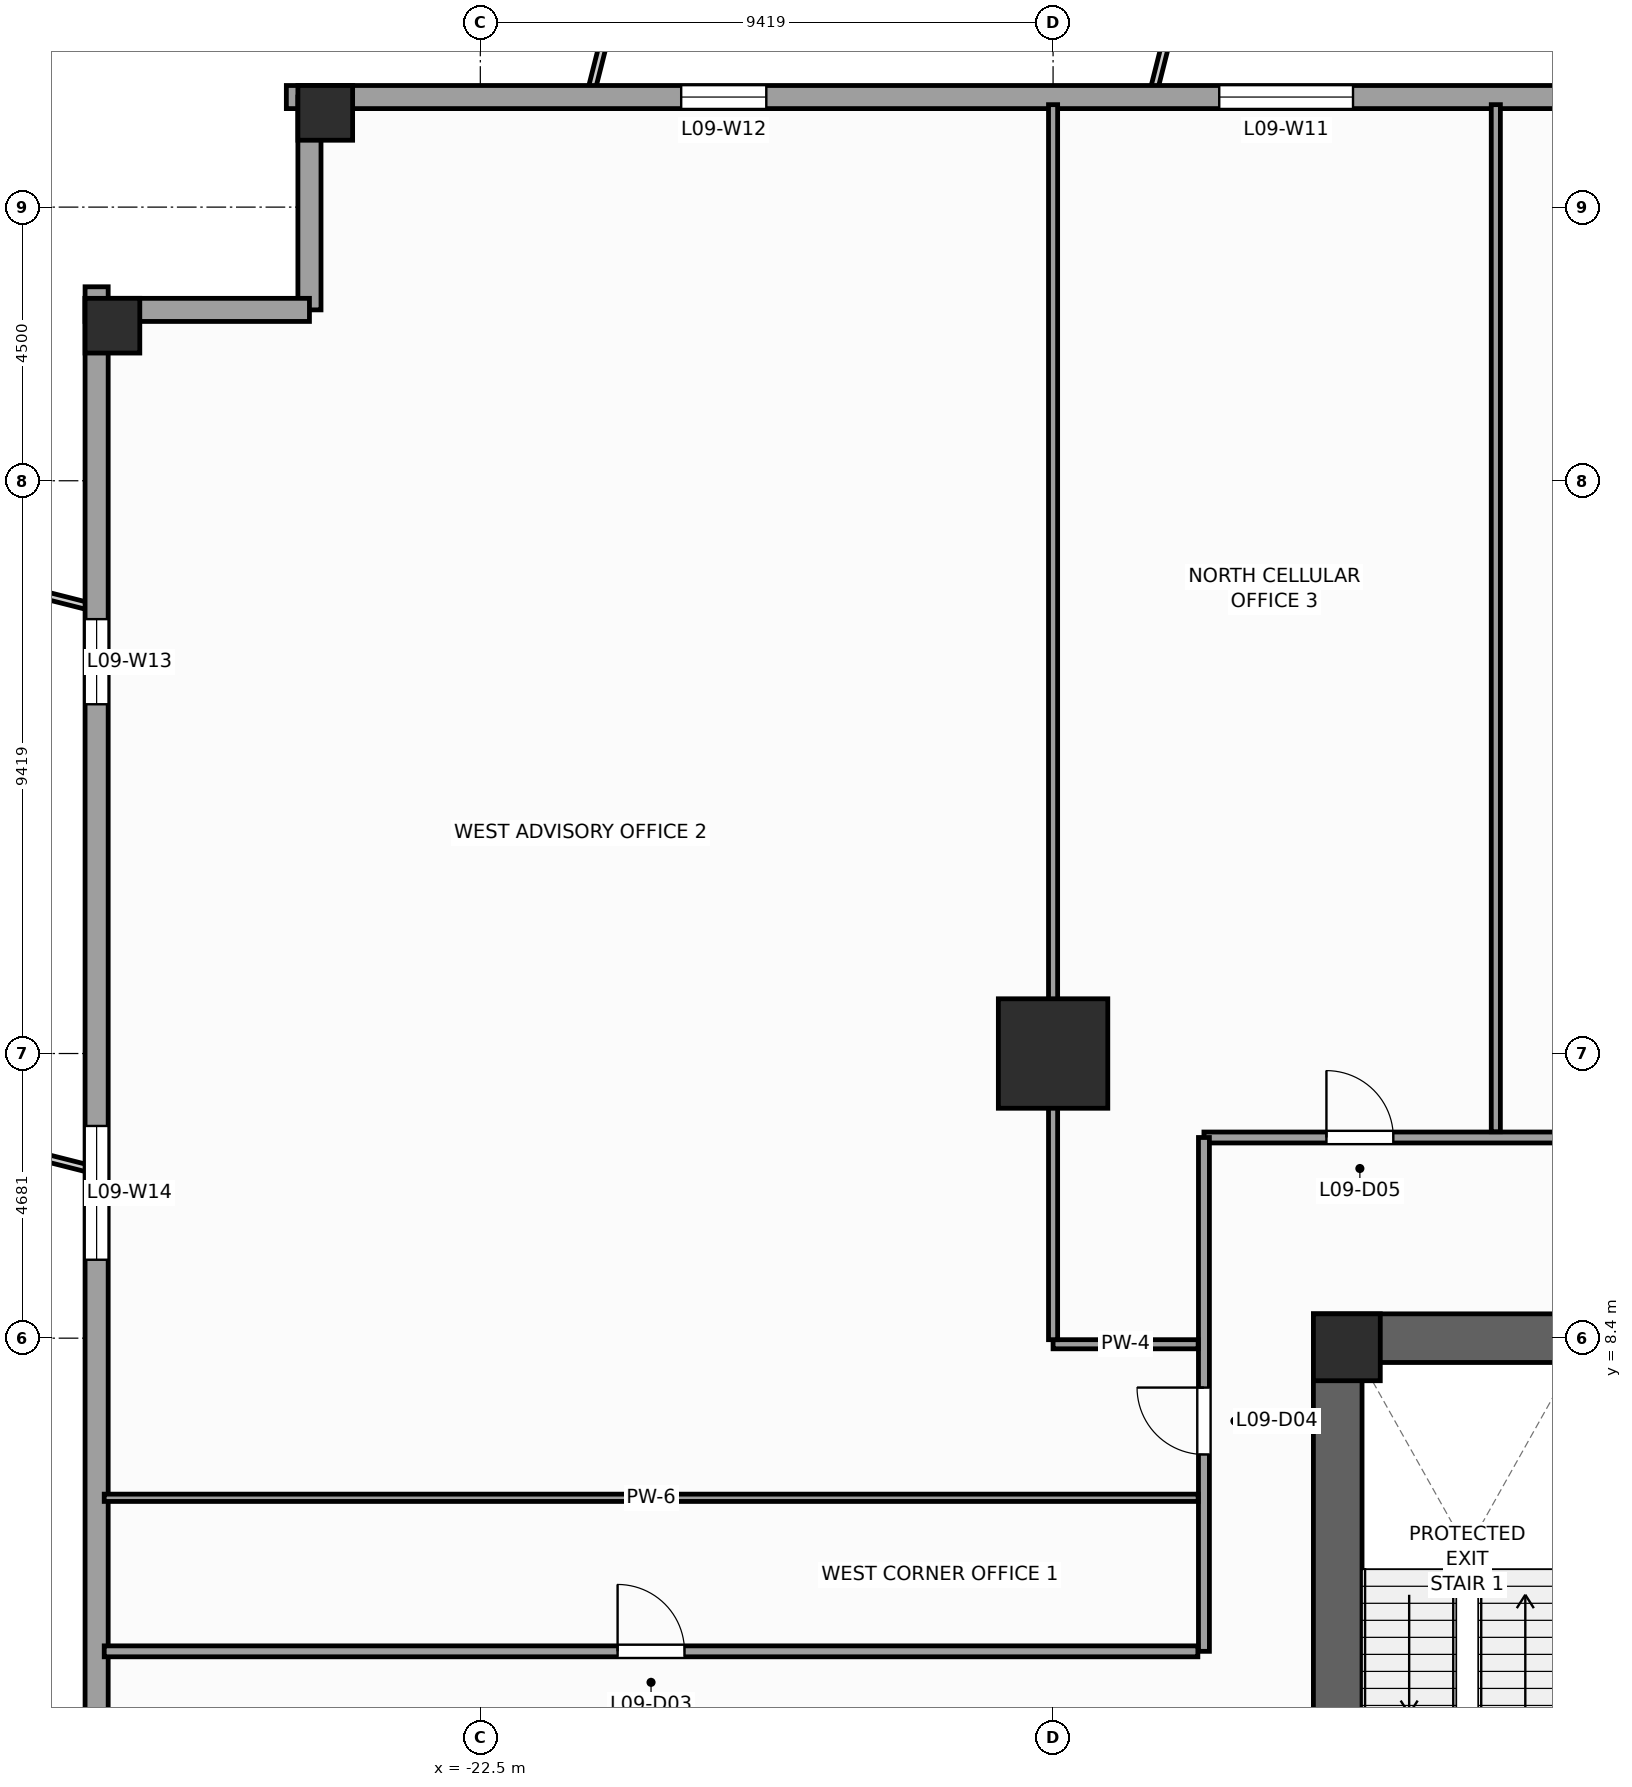
"""IFC4 building model, lengths in metres.
Left out: names, types, materials, properties, quantities, classifications, styles, units other than length and angle.
Written with IfcOpenShell. Run it as: python <this file> out.ifc"""

import sys

from ifc_helpers import new_model, si_unit, direction, frame, frame_2d, origin, origin_2d, place, context, subcontext, project, spatial, rectangle, extrude, source, transform, mapped, element, fill, save


model = new_model("IFC4")
c1 = context("Model", 3, precision=1e-05, world=origin(), true_north=direction((0.0, 1.0)))
c2 = subcontext(c1, "Body", "Model", "MODEL_VIEW")
j1 = project(units=[si_unit("LENGTHUNIT", "METRE"), si_unit("PLANEANGLEUNIT", "RADIAN")], contexts=[c1])
p1 = place(None, origin())
s1 = spatial("IfcSite", under=j1, at=p1, CompositionType="ELEMENT")
p2 = place(p1, origin())
s2 = spatial("IfcBuilding", under=s1, at=p2, CompositionType="ELEMENT")
p3 = place(p2, frame((0.0, 0.0, 42.0)))
s3 = spatial("IfcBuildingStorey", under=s2, at=p3, CompositionType="ELEMENT", Elevation=42.0)
p4 = place(p3, frame((-8.8, 8.4, 0.0), z_axis=(0.0, 0.0, 1.0), x_axis=(1.0, 0.0, 0.0)))
e1 = element("IfcWall", 1, at=p4, inside=s3, PredefinedType="SHEAR", context=c2, shape_type="SweptSolid", body=[
    extrude(rectangle(XDim=17.6, YDim=0.8, at=frame_2d((8.8, 0.0))), origin(), (0.0, 0.0, 1.0), 4.0),
])
p5 = place(p3, frame((-8.4, -8.0, 0.0), z_axis=(0.0, 0.0, 1.0), x_axis=(0.0, 1.0, 0.0)))
e2 = element("IfcWall", 2, at=p5, inside=s3, PredefinedType="SHEAR", context=c2, shape_type="SweptSolid", body=[
    extrude(rectangle(XDim=16.0, YDim=0.8, at=frame_2d((8.0, 0.0))), origin(), (0.0, 0.0, 1.0), 4.0),
])
p6 = place(p5, frame((4.69, 0.0, 0.0)))
e3 = element("IfcOpeningElement", 3, at=p6, cuts=e2, PredefinedType="OPENING", context=c2, shape_type="SweptSolid", body=[
    extrude(rectangle(XDim=1.3, YDim=2.2, at=frame_2d((0.65, 1.1))), frame((0.0, 0.41, 0.0), z_axis=(0.0, -1.0, 0.0), x_axis=(1.0, 0.0, 0.0)), (0.0, 0.0, 1.0), 0.82),
])
m1 = source(origin(), c2, "Body", "SweptSolid", [
    extrude(rectangle(XDim=1.1, YDim=1.1, at=origin_2d()), origin(), (0.0, 0.0, 1.0), 4.0),
])
p7 = place(p3, frame((-8.25, 8.25, 0.0), z_axis=(0.0, 0.0, 1.0), x_axis=(1.0, 0.0, 0.0)))
e4 = element("IfcColumn", 4, at=p7, inside=s3, PredefinedType="PILASTER", context=c2, shape_type="MappedRepresentation", body=[
    mapped(m1, transform((0.0, 0.0, 0.0), scale=1.0)),
])
m2 = source(origin(), c2, "Body", "SweptSolid", [
    extrude(rectangle(XDim=1.8, YDim=1.8, at=origin_2d()), origin(), (0.0, 0.0, 1.0), 4.0),
])
p8 = place(p3, frame((-13.081, 13.081, 0.0), z_axis=(0.0, 0.0, 1.0), x_axis=(1.0, 0.0, 0.0)))
e5 = element("IfcColumn", 5, at=p8, inside=s3, PredefinedType="COLUMN", context=c2, shape_type="MappedRepresentation", body=[
    mapped(m2, transform((0.0, 0.0, 0.0), scale=1.0)),
])
m3 = source(origin(), c2, "Body", "SweptSolid", [
    extrude(rectangle(XDim=0.9, YDim=0.9, at=origin_2d()), origin(), (0.0, 0.0, 1.0), 4.0),
])
for number, where, z_axis, x_axis in (
    (6, (-25.05, 28.55, 0.0), (0.0, 0.0, 1.0), (1.0, 0.0, 0.0)),
    (7, (-28.55, 25.05, 0.0), (0.0, 0.0, 1.0), (1.0, 0.0, 0.0)),
):
    element("IfcColumn", number, at=place(p3, frame(where, z_axis=z_axis, x_axis=x_axis)), inside=s3, PredefinedType="COLUMN", context=c2, shape_type="MappedRepresentation", body=[
        mapped(m3, transform((0.0, 0.0, 0.0), scale=1.0)),
    ])
p9 = place(p3, frame((25.69, 28.81, 0.0), z_axis=(0.0, 0.0, 1.0), x_axis=(-1.0, 0.0, 0.0)))
e8 = element("IfcWall", 8, at=p9, inside=s3, PredefinedType="STANDARD", context=c2, shape_type="SweptSolid", body=[
    extrude(rectangle(XDim=51.38, YDim=0.38, at=frame_2d((25.69, 0.0))), origin(), (0.0, 0.0, 1.0), 3.12),
])
p10 = place(p9, frame((20.415, 0.0, 0.0)))
e9 = element("IfcOpeningElement", 9, at=p10, cuts=e8, PredefinedType="OPENING", context=c2, shape_type="SweptSolid", body=[
    extrude(rectangle(XDim=1.05, YDim=2.25, at=frame_2d((0.525, 1.125))), frame((0.0, 0.2, 0.0), z_axis=(0.0, -1.0, 0.0), x_axis=(1.0, 0.0, 0.0)), (0.0, 0.0, 1.0), 0.4),
])
p11 = place(p9, frame((5.466, 0.0, 0.49)))
e10 = element("IfcOpeningElement", 10, at=p11, cuts=e8, PredefinedType="OPENING", context=c2, shape_type="SweptSolid", body=[
    extrude(rectangle(XDim=1.4, YDim=2.4, at=frame_2d((0.7, 1.2))), frame((0.0, 0.2, 0.0), z_axis=(0.0, -1.0, 0.0), x_axis=(1.0, 0.0, 0.0)), (0.0, 0.0, 1.0), 0.4),
])
p12 = place(p9, frame((13.8, 0.0, 0.49)))
e11 = element("IfcOpeningElement", 11, at=p12, cuts=e8, PredefinedType="OPENING", context=c2, shape_type="SweptSolid", body=[
    extrude(rectangle(XDim=2.2, YDim=2.4, at=frame_2d((1.1, 1.2))), frame((0.0, 0.2, 0.0), z_axis=(0.0, -1.0, 0.0), x_axis=(1.0, 0.0, 0.0)), (0.0, 0.0, 1.0), 0.4),
])
p13 = place(p9, frame((33.838, 0.0, 0.49)))
e12 = element("IfcOpeningElement", 12, at=p13, cuts=e8, PredefinedType="OPENING", context=c2, shape_type="SweptSolid", body=[
    extrude(rectangle(XDim=2.2, YDim=2.4, at=frame_2d((1.1, 1.2))), frame((0.0, 0.2, 0.0), z_axis=(0.0, -1.0, 0.0), x_axis=(1.0, 0.0, 0.0)), (0.0, 0.0, 1.0), 0.4),
])
p14 = place(p9, frame((43.487, 0.0, 0.49)))
e13 = element("IfcOpeningElement", 13, at=p14, cuts=e8, PredefinedType="OPENING", context=c2, shape_type="SweptSolid", body=[
    extrude(rectangle(XDim=1.4, YDim=2.4, at=frame_2d((0.7, 1.2))), frame((0.0, 0.2, 0.0), z_axis=(0.0, -1.0, 0.0), x_axis=(1.0, 0.0, 0.0)), (0.0, 0.0, 1.0), 0.4),
])
p15 = place(p3, frame((-25.31, 28.81, 0.0), z_axis=(0.0, 0.0, 1.0), x_axis=(0.0, -1.0, 0.0)))
e14 = element("IfcWall", 14, at=p15, inside=s3, PredefinedType="STANDARD", context=c2, shape_type="SweptSolid", body=[
    extrude(rectangle(XDim=3.5, YDim=0.38, at=frame_2d((1.75, 0.0))), origin(), (0.0, 0.0, 1.0), 3.72),
])
p16 = place(p3, frame((-25.31, 25.31, 0.0), z_axis=(0.0, 0.0, 1.0), x_axis=(-1.0, 0.0, 0.0)))
e15 = element("IfcWall", 15, at=p16, inside=s3, PredefinedType="STANDARD", context=c2, shape_type="SweptSolid", body=[
    extrude(rectangle(XDim=3.69, YDim=0.38, at=frame_2d((1.845, 0.0))), origin(), (0.0, 0.0, 1.0), 3.72),
])
p17 = place(p3, frame((-28.81, 25.69, 0.0), z_axis=(0.0, 0.0, 1.0), x_axis=(0.0, -1.0, 0.0)))
e16 = element("IfcWall", 16, at=p17, inside=s3, PredefinedType="STANDARD", context=c2, shape_type="SweptSolid", body=[
    extrude(rectangle(XDim=51.38, YDim=0.38, at=frame_2d((25.69, 0.0))), origin(), (0.0, 0.0, 1.0), 3.12),
])
p18 = place(p17, frame((5.466, 0.0, 0.49)))
e17 = element("IfcOpeningElement", 17, at=p18, cuts=e16, PredefinedType="OPENING", context=c2, shape_type="SweptSolid", body=[
    extrude(rectangle(XDim=1.4, YDim=2.4, at=frame_2d((0.7, 1.2))), frame((0.0, 0.2, 0.0), z_axis=(0.0, -1.0, 0.0), x_axis=(1.0, 0.0, 0.0)), (0.0, 0.0, 1.0), 0.4),
])
p19 = place(p17, frame((13.8, 0.0, 0.49)))
e18 = element("IfcOpeningElement", 18, at=p19, cuts=e16, PredefinedType="OPENING", context=c2, shape_type="SweptSolid", body=[
    extrude(rectangle(XDim=2.2, YDim=2.4, at=frame_2d((1.1, 1.2))), frame((0.0, 0.2, 0.0), z_axis=(0.0, -1.0, 0.0), x_axis=(1.0, 0.0, 0.0)), (0.0, 0.0, 1.0), 0.4),
])
p20 = place(p17, frame((33.838, 0.0, 0.49)))
e19 = element("IfcOpeningElement", 19, at=p20, cuts=e16, PredefinedType="OPENING", context=c2, shape_type="SweptSolid", body=[
    extrude(rectangle(XDim=2.2, YDim=2.4, at=frame_2d((1.1, 1.2))), frame((0.0, 0.2, 0.0), z_axis=(0.0, -1.0, 0.0), x_axis=(1.0, 0.0, 0.0)), (0.0, 0.0, 1.0), 0.4),
])
p21 = place(p17, frame((43.487, 0.0, 0.49)))
e20 = element("IfcOpeningElement", 20, at=p21, cuts=e16, PredefinedType="OPENING", context=c2, shape_type="SweptSolid", body=[
    extrude(rectangle(XDim=1.4, YDim=2.4, at=frame_2d((0.7, 1.2))), frame((0.0, 0.2, 0.0), z_axis=(0.0, -1.0, 0.0), x_axis=(1.0, 0.0, 0.0)), (0.0, 0.0, 1.0), 0.4),
])
p22 = place(p3, frame((-10.6, 11.7, 0.0), z_axis=(0.0, 0.0, 1.0), x_axis=(1.0, 0.0, 0.0)))
e21 = element("IfcWall", 21, at=p22, inside=s3, PredefinedType="PARTITIONING", context=c2, shape_type="SweptSolid", body=[
    extrude(rectangle(XDim=22.3, YDim=0.18, at=frame_2d((11.15, 0.0))), origin(), (0.0, 0.0, 1.0), 3.72),
])
p23 = place(p22, frame((2.014, 0.0, 0.0)))
e22 = element("IfcOpeningElement", 22, at=p23, cuts=e21, PredefinedType="OPENING", context=c2, shape_type="SweptSolid", body=[
    extrude(rectangle(XDim=1.1, YDim=2.2, at=frame_2d((0.55, 1.1))), frame((0.0, 0.1, 0.0), z_axis=(0.0, -1.0, 0.0), x_axis=(1.0, 0.0, 0.0)), (0.0, 0.0, 1.0), 0.2),
])
p24 = place(p22, frame((7.4, 0.0, 0.0)))
e23 = element("IfcOpeningElement", 23, at=p24, cuts=e21, PredefinedType="OPENING", context=c2, shape_type="SweptSolid", body=[
    extrude(rectangle(XDim=1.1, YDim=2.2, at=frame_2d((0.55, 1.1))), frame((0.0, 0.1, 0.0), z_axis=(0.0, -1.0, 0.0), x_axis=(1.0, 0.0, 0.0)), (0.0, 0.0, 1.0), 0.2),
])
p25 = place(p22, frame((13.4, 0.0, 0.0)))
e24 = element("IfcOpeningElement", 24, at=p25, cuts=e21, PredefinedType="OPENING", context=c2, shape_type="SweptSolid", body=[
    extrude(rectangle(XDim=1.1, YDim=2.2, at=frame_2d((0.55, 1.1))), frame((0.0, 0.1, 0.0), z_axis=(0.0, -1.0, 0.0), x_axis=(1.0, 0.0, 0.0)), (0.0, 0.0, 1.0), 0.2),
])
p26 = place(p22, frame((18.835, 0.0, 0.0)))
e25 = element("IfcOpeningElement", 25, at=p26, cuts=e21, PredefinedType="OPENING", context=c2, shape_type="SweptSolid", body=[
    extrude(rectangle(XDim=1.1, YDim=2.2, at=frame_2d((0.55, 1.1))), frame((0.0, 0.1, 0.0), z_axis=(0.0, -1.0, 0.0), x_axis=(1.0, 0.0, 0.0)), (0.0, 0.0, 1.0), 0.2),
])
p27 = place(p3, frame((-10.6, 3.25, 0.0), z_axis=(0.0, 0.0, 1.0), x_axis=(0.0, 1.0, 0.0)))
e26 = element("IfcWall", 26, at=p27, inside=s3, PredefinedType="PARTITIONING", context=c2, shape_type="SweptSolid", body=[
    extrude(rectangle(XDim=8.45, YDim=0.18, at=frame_2d((4.225, 0.0))), origin(), (0.0, 0.0, 1.0), 3.72),
])
p28 = place(p27, frame((3.238, 0.0, 0.0)))
e27 = element("IfcOpeningElement", 27, at=p28, cuts=e26, PredefinedType="OPENING", context=c2, shape_type="SweptSolid", body=[
    extrude(rectangle(XDim=1.1, YDim=2.2, at=frame_2d((0.55, 1.1))), frame((0.0, 0.1, 0.0), z_axis=(0.0, -1.0, 0.0), x_axis=(1.0, 0.0, 0.0)), (0.0, 0.0, 1.0), 0.2),
])
p29 = place(p3, frame((-28.685, 3.25, 0.0), z_axis=(0.0, 0.0, 1.0), x_axis=(1.0, 0.0, 0.0)))
e28 = element("IfcWall", 28, at=p29, inside=s3, PredefinedType="PARTITIONING", context=c2, shape_type="SweptSolid", body=[
    extrude(rectangle(XDim=17.985, YDim=0.18, at=frame_2d((8.993, 0.0))), origin(), (0.0, 0.0, 1.0), 3.72),
])
p30 = place(p29, frame((8.442, 0.0, 0.0)))
e29 = element("IfcOpeningElement", 29, at=p30, cuts=e28, PredefinedType="OPENING", context=c2, shape_type="SweptSolid", body=[
    extrude(rectangle(XDim=1.1, YDim=2.2, at=frame_2d((0.55, 1.1))), frame((0.0, 0.1, 0.0), z_axis=(0.0, -1.0, 0.0), x_axis=(1.0, 0.0, 0.0)), (0.0, 0.0, 1.0), 0.2),
])
p31 = place(p3, frame((-10.695, 8.3, 0.0), z_axis=(0.0, 0.0, 1.0), x_axis=(-1.0, 0.0, 0.0)))
e30 = element("IfcWall", 30, at=p31, inside=s3, PredefinedType="PARTITIONING", context=c2, shape_type="SweptSolid", body=[
    extrude(rectangle(XDim=2.386, YDim=0.15, at=frame_2d((1.193, 0.0))), origin(), (0.0, 0.0, 1.0), 3.72),
])
p32 = place(p3, frame((-13.081, 8.375, 0.0), z_axis=(0.0, 0.0, 1.0), x_axis=(0.0, 1.0, 0.0)))
e31 = element("IfcWall", 31, at=p32, inside=s3, PredefinedType="PARTITIONING", context=c2, shape_type="SweptSolid", body=[
    extrude(rectangle(XDim=20.31, YDim=0.15, at=frame_2d((10.155, 0.0))), origin(), (0.0, 0.0, 1.0), 2.712),
])
p33 = place(p3, frame((-5.8, 11.795, 0.0), z_axis=(0.0, 0.0, 1.0), x_axis=(0.0, 1.0, 0.0)))
e32 = element("IfcWall", 32, at=p33, inside=s3, PredefinedType="PARTITIONING", context=c2, shape_type="SweptSolid", body=[
    extrude(rectangle(XDim=16.89, YDim=0.15, at=frame_2d((8.445, 0.0))), origin(), (0.0, 0.0, 1.0), 3.72),
])
p34 = place(p3, frame((-28.685, 5.775, 0.0), z_axis=(0.0, 0.0, 1.0), x_axis=(1.0, 0.0, 0.0)))
e33 = element("IfcWall", 33, at=p34, inside=s3, PredefinedType="PARTITIONING", context=c2, shape_type="SweptSolid", body=[
    extrude(rectangle(XDim=17.99, YDim=0.12, at=frame_2d((8.995, 0.0))), origin(), (0.0, 0.0, 1.0), 3.72),
])
m4 = source(origin(), c2, "Body", "SweptSolid", [
    extrude(rectangle(XDim=2.2, YDim=2.4, at=frame_2d((1.1, 1.2))), frame((0.0, 0.03, 0.0), z_axis=(0.0, -1.0, 0.0), x_axis=(1.0, 0.0, 0.0)), (0.0, 0.0, 1.0), 0.06),
])
p35 = place(p13, origin())
e34 = element("IfcWindow", 34, at=p35, inside=s3, PartitioningType="SINGLE_PANEL", PredefinedType="WINDOW", context=c2, shape_type="MappedRepresentation", body=[
    mapped(m4, transform((0.0, 0.0, 0.0), scale=1.0)),
])
fill(e12, e34)
m5 = source(origin(), c2, "Body", "SweptSolid", [
    extrude(rectangle(XDim=1.4, YDim=2.4, at=frame_2d((0.7, 1.2))), frame((0.0, 0.03, 0.0), z_axis=(0.0, -1.0, 0.0), x_axis=(1.0, 0.0, 0.0)), (0.0, 0.0, 1.0), 0.06),
])
p36 = place(p14, origin())
e35 = element("IfcWindow", 35, at=p36, inside=s3, PartitioningType="SINGLE_PANEL", PredefinedType="WINDOW", context=c2, shape_type="MappedRepresentation", body=[
    mapped(m5, transform((0.0, 0.0, 0.0), scale=1.0)),
])
fill(e13, e35)
p37 = place(p18, origin())
e36 = element("IfcWindow", 36, at=p37, inside=s3, PartitioningType="SINGLE_PANEL", PredefinedType="WINDOW", context=c2, shape_type="MappedRepresentation", body=[
    mapped(m5, transform((0.0, 0.0, 0.0), scale=1.0)),
])
fill(e17, e36)
p38 = place(p19, origin())
e37 = element("IfcWindow", 37, at=p38, inside=s3, PartitioningType="SINGLE_PANEL", PredefinedType="WINDOW", context=c2, shape_type="MappedRepresentation", body=[
    mapped(m4, transform((0.0, 0.0, 0.0), scale=1.0)),
])
fill(e18, e37)
m6 = source(origin(), c2, "Body", "SweptSolid", [
    extrude(rectangle(XDim=1.1, YDim=2.2, at=frame_2d((0.55, 1.1))), frame((0.0, 0.025, 0.0), z_axis=(0.0, -1.0, 0.0), x_axis=(1.0, 0.0, 0.0)), (0.0, 0.0, 1.0), 0.05),
])
p39 = place(p30, origin())
e38 = element("IfcDoor", 38, at=p39, inside=s3, OperationType="SINGLE_SWING_LEFT", PredefinedType="DOOR", context=c2, shape_type="MappedRepresentation", body=[
    mapped(m6, transform((0.0, 0.0, 0.0), scale=1.0)),
])
fill(e29, e38)
p40 = place(p28, origin())
e39 = element("IfcDoor", 39, at=p40, inside=s3, OperationType="SINGLE_SWING_RIGHT", PredefinedType="DOOR", context=c2, shape_type="MappedRepresentation", body=[
    mapped(m6, transform((0.0, 0.0, 0.0), scale=1.0)),
])
fill(e27, e39)
p41 = place(p23, origin())
e40 = element("IfcDoor", 40, at=p41, inside=s3, OperationType="SINGLE_SWING_LEFT", PredefinedType="DOOR", context=c2, shape_type="MappedRepresentation", body=[
    mapped(m6, transform((0.0, 0.0, 0.0), scale=1.0)),
])
fill(e22, e40)
save(model, sys.argv[1])
